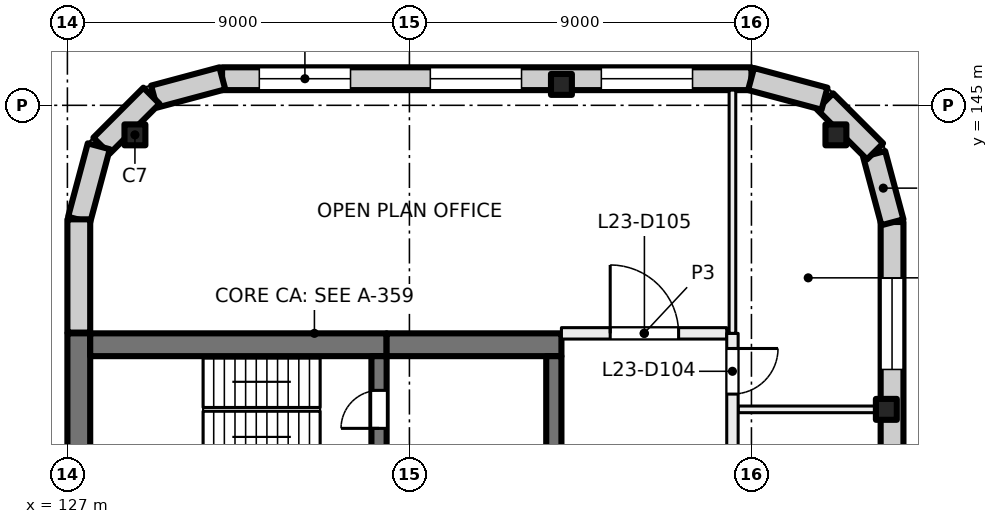
"""IFC4 building model, lengths in metres.
Left out: names, types, materials, properties, quantities, classifications, styles, units other than length and angle.
Written with IfcOpenShell. Run it as: python <this file> out.ifc"""

import sys

from ifc_helpers import new_model, si_unit, direction, frame, frame_2d, origin, origin_2d, place, context, subcontext, project, spatial, rectangle, extrude, element, fill, save


model = new_model("IFC4")
c1 = context("Model", 3, precision=1e-05, world=origin(), true_north=direction((0.0, 1.0)))
c2 = subcontext(c1, "Body", "Model", "MODEL_VIEW")
j1 = project(units=[si_unit("LENGTHUNIT", "METRE"), si_unit("PLANEANGLEUNIT", "RADIAN")], contexts=[c1])
p1 = place(None, origin())
s1 = spatial("IfcSite", under=j1, at=p1, CompositionType="ELEMENT")
p2 = place(p1, origin())
s2 = spatial("IfcBuilding", under=s1, at=p2, CompositionType="ELEMENT")
p3 = place(p2, frame((0.0, 0.0, 101.0)))
s3 = spatial("IfcBuildingStorey", under=s2, at=p3, CompositionType="ELEMENT", Elevation=101.0)
for number, where, z_axis, x_axis in (
    (1, (128.777, 144.223, 0.0), (0.0, 0.0, 1.0), (1.0, 0.0, 0.0)),
    (2, (148.55, 137.0, 0.0), (0.0, 0.0, 1.0), (1.0, 0.0, 0.0)),
    (3, (140.0, 145.55, 0.0), (0.0, 0.0, 1.0), (1.0, 0.0, 0.0)),
    (4, (147.223, 144.223, 0.0), (0.0, 0.0, 1.0), (1.0, 0.0, 0.0)),
):
    element("IfcColumn", number, at=place(p3, frame(where, z_axis=z_axis, x_axis=x_axis)), inside=s3, PredefinedType="COLUMN", context=c2, shape_type="SweptSolid", body=[
        extrude(rectangle(XDim=0.55, YDim=0.55, at=origin_2d()), origin(), (0.0, 0.0, 1.0), 4.0),
    ])
p4 = place(p3, frame((127.3, 135.2, 0.0), z_axis=(0.0, 0.0, 1.0), x_axis=(0.0, 1.0, 0.0)))
e5 = element("IfcWall", 5, at=p4, inside=s3, PredefinedType="SHEAR", context=c2, shape_type="SweptSolid", body=[
    extrude(rectangle(XDim=3.8, YDim=0.6, at=frame_2d((1.9, 0.0))), origin(), (0.0, 0.0, 1.0), 4.0),
])
p5 = place(p3, frame((127.6, 138.7, 0.0), z_axis=(0.0, 0.0, 1.0), x_axis=(1.0, 0.0, 0.0)))
e6 = element("IfcWall", 6, at=p5, inside=s3, PredefinedType="SHEAR", context=c2, shape_type="SweptSolid", body=[
    extrude(rectangle(XDim=7.8, YDim=0.6, at=frame_2d((3.9, 0.0))), origin(), (0.0, 0.0, 1.0), 4.0),
])
p6 = place(p3, frame((135.4, 138.7, 0.0), z_axis=(0.0, 0.0, 1.0), x_axis=(1.0, 0.0, 0.0)))
e7 = element("IfcWall", 7, at=p6, inside=s3, PredefinedType="SHEAR", context=c2, shape_type="SweptSolid", body=[
    extrude(rectangle(XDim=4.6, YDim=0.6, at=frame_2d((2.3, 0.0))), origin(), (0.0, 0.0, 1.0), 4.0),
])
p7 = place(p3, frame((135.2, 135.6, 0.0), z_axis=(0.0, 0.0, 1.0), x_axis=(0.0, 1.0, 0.0)))
e8 = element("IfcWall", 8, at=p7, inside=s3, PredefinedType="SHEAR", context=c2, shape_type="SweptSolid", body=[
    extrude(rectangle(XDim=2.8, YDim=0.4, at=frame_2d((1.4, 0.0))), origin(), (0.0, 0.0, 1.0), 4.0),
])
p8 = place(p7, frame((0.9, 0.0, 0.0)))
e9 = element("IfcOpeningElement", 9, at=p8, cuts=e8, PredefinedType="OPENING", context=c2, shape_type="SweptSolid", body=[
    extrude(rectangle(XDim=1.0, YDim=2.1, at=frame_2d((0.5, 1.05))), frame((0.0, 0.21, 0.0), z_axis=(0.0, -1.0, 0.0), x_axis=(1.0, 0.0, 0.0)), (0.0, 0.0, 1.0), 0.42),
])
p9 = place(p3, frame((139.8, 129.8, 0.0), z_axis=(0.0, 0.0, 1.0), x_axis=(0.0, 1.0, 0.0)))
e10 = element("IfcWall", 10, at=p9, inside=s3, PredefinedType="SHEAR", context=c2, shape_type="SweptSolid", body=[
    extrude(rectangle(XDim=8.6, YDim=0.4, at=frame_2d((4.3, 0.0))), origin(), (0.0, 0.0, 1.0), 4.0),
])
p10 = place(p3, frame((131.07, 145.7, 0.0), z_axis=(0.0, 0.0, 1.0), x_axis=(1.0, 0.0, 0.0)))
e11 = element("IfcWall", 11, at=p10, inside=s3, PredefinedType="SOLIDWALL", context=c2, shape_type="SweptSolid", body=[
    extrude(rectangle(XDim=13.93, YDim=0.6, at=frame_2d((6.965, 0.0))), origin(), (0.0, 0.0, 1.0), 3.625),
])
p11 = place(p10, frame((0.98, 0.0, 0.9)))
e12 = element("IfcOpeningElement", 12, at=p11, cuts=e11, PredefinedType="OPENING", context=c2, shape_type="SweptSolid", body=[
    extrude(rectangle(XDim=2.4, YDim=2.4, at=frame_2d((1.2, 1.2))), frame((0.0, 0.31, 0.0), z_axis=(0.0, -1.0, 0.0), x_axis=(1.0, 0.0, 0.0)), (0.0, 0.0, 1.0), 0.62),
])
p12 = place(p10, frame((5.48, 0.0, 0.9)))
e13 = element("IfcOpeningElement", 13, at=p12, cuts=e11, PredefinedType="OPENING", context=c2, shape_type="SweptSolid", body=[
    extrude(rectangle(XDim=2.4, YDim=2.4, at=frame_2d((1.2, 1.2))), frame((0.0, 0.31, 0.0), z_axis=(0.0, -1.0, 0.0), x_axis=(1.0, 0.0, 0.0)), (0.0, 0.0, 1.0), 0.62),
])
p13 = place(p10, frame((9.98, 0.0, 0.9)))
e14 = element("IfcOpeningElement", 14, at=p13, cuts=e11, PredefinedType="OPENING", context=c2, shape_type="SweptSolid", body=[
    extrude(rectangle(XDim=2.4, YDim=2.4, at=frame_2d((1.2, 1.2))), frame((0.0, 0.31, 0.0), z_axis=(0.0, -1.0, 0.0), x_axis=(1.0, 0.0, 0.0)), (0.0, 0.0, 1.0), 0.62),
])
for number, where, z_axis, x_axis in (
    (15, (129.281, 145.229, 0.0), (0.0, 0.0, 1.0), (0.966, 0.259, 0.0)),
    (16, (127.896, 143.936, 0.0), (0.0, 0.0, 1.0), (0.707, 0.707, 0.0)),
):
    element("IfcWall", number, at=place(p3, frame(where, z_axis=z_axis, x_axis=x_axis)), inside=s3, PredefinedType="SOLIDWALL", context=c2, shape_type="SweptSolid", body=[
        extrude(rectangle(XDim=1.861, YDim=0.6, at=frame_2d((0.93, 0.0))), origin(), (0.0, 0.0, 1.0), 3.625),
    ])
p14 = place(p3, frame((127.308, 141.99, 0.0), z_axis=(0.0, 0.0, 1.0), x_axis=(0.258839784042, 0.965920269068, 0.0)))
e17 = element("IfcWall", 17, at=p14, inside=s3, PredefinedType="SOLIDWALL", context=c2, shape_type="SweptSolid", body=[
    extrude(rectangle(XDim=2.0, YDim=0.6, at=frame_2d((1.0, 0.0))), origin(), (0.0, 0.0, 1.0), 3.625),
])
p15 = place(p3, frame((127.3, 139.02, 0.0), z_axis=(0.0, 0.0, 1.0), x_axis=(0.0, 1.0, 0.0)))
e18 = element("IfcWall", 18, at=p15, inside=s3, PredefinedType="SOLIDWALL", context=c2, shape_type="SweptSolid", body=[
    extrude(rectangle(XDim=2.98, YDim=0.6, at=frame_2d((1.49, 0.0))), origin(), (0.0, 0.0, 1.0), 3.625),
])
p16 = place(p3, frame((148.7, 141.93, 0.0), z_axis=(0.0, 0.0, 1.0), x_axis=(0.0, -1.0, 0.0)))
e19 = element("IfcWall", 19, at=p16, inside=s3, PredefinedType="SOLIDWALL", context=c2, shape_type="SweptSolid", body=[
    extrude(rectangle(XDim=27.93, YDim=0.6, at=frame_2d((13.965, 0.0))), origin(), (0.0, 0.0, 1.0), 3.625),
])
p17 = place(p16, frame((1.48, 0.0, 0.9)))
e20 = element("IfcOpeningElement", 20, at=p17, cuts=e19, PredefinedType="OPENING", context=c2, shape_type="SweptSolid", body=[
    extrude(rectangle(XDim=2.4, YDim=2.4, at=frame_2d((1.2, 1.2))), frame((0.0, 0.31, 0.0), z_axis=(0.0, -1.0, 0.0), x_axis=(1.0, 0.0, 0.0)), (0.0, 0.0, 1.0), 0.62),
])
p18 = place(p16, frame((5.98, 0.0, 0.9)))
e21 = element("IfcOpeningElement", 21, at=p18, cuts=e19, PredefinedType="OPENING", context=c2, shape_type="SweptSolid", body=[
    extrude(rectangle(XDim=2.4, YDim=2.4, at=frame_2d((1.2, 1.2))), frame((0.0, 0.31, 0.0), z_axis=(0.0, -1.0, 0.0), x_axis=(1.0, 0.0, 0.0)), (0.0, 0.0, 1.0), 0.62),
])
p19 = place(p16, frame((10.48, 0.0, 0.9)))
e22 = element("IfcOpeningElement", 22, at=p19, cuts=e19, PredefinedType="OPENING", context=c2, shape_type="SweptSolid", body=[
    extrude(rectangle(XDim=2.4, YDim=2.4, at=frame_2d((1.2, 1.2))), frame((0.0, 0.31, 0.0), z_axis=(0.0, -1.0, 0.0), x_axis=(1.0, 0.0, 0.0)), (0.0, 0.0, 1.0), 0.62),
])
p20 = place(p16, frame((14.98, 0.0, 0.9)))
e23 = element("IfcOpeningElement", 23, at=p20, cuts=e19, PredefinedType="OPENING", context=c2, shape_type="SweptSolid", body=[
    extrude(rectangle(XDim=2.4, YDim=2.4, at=frame_2d((1.2, 1.2))), frame((0.0, 0.31, 0.0), z_axis=(0.0, -1.0, 0.0), x_axis=(1.0, 0.0, 0.0)), (0.0, 0.0, 1.0), 0.62),
])
p21 = place(p16, frame((19.48, 0.0, 0.9)))
e24 = element("IfcOpeningElement", 24, at=p21, cuts=e19, PredefinedType="OPENING", context=c2, shape_type="SweptSolid", body=[
    extrude(rectangle(XDim=2.4, YDim=2.4, at=frame_2d((1.2, 1.2))), frame((0.0, 0.31, 0.0), z_axis=(0.0, -1.0, 0.0), x_axis=(1.0, 0.0, 0.0)), (0.0, 0.0, 1.0), 0.62),
])
p22 = place(p16, frame((23.98, 0.0, 0.9)))
e25 = element("IfcOpeningElement", 25, at=p22, cuts=e19, PredefinedType="OPENING", context=c2, shape_type="SweptSolid", body=[
    extrude(rectangle(XDim=2.4, YDim=2.4, at=frame_2d((1.2, 1.2))), frame((0.0, 0.31, 0.0), z_axis=(0.0, -1.0, 0.0), x_axis=(1.0, 0.0, 0.0)), (0.0, 0.0, 1.0), 0.62),
])
for number, where, z_axis, x_axis in (
    (26, (148.229, 143.719, 0.0), (0.0, 0.0, 1.0), (0.259, -0.966, 0.0)),
    (27, (146.936, 145.104, 0.0), (0.0, 0.0, 1.0), (0.707, -0.707, 0.0)),
):
    element("IfcWall", number, at=place(p3, frame(where, z_axis=z_axis, x_axis=x_axis)), inside=s3, PredefinedType="SOLIDWALL", context=c2, shape_type="SweptSolid", body=[
        extrude(rectangle(XDim=1.861, YDim=0.6, at=frame_2d((0.93, 0.0))), origin(), (0.0, 0.0, 1.0), 3.625),
    ])
p23 = place(p3, frame((144.99, 145.692, 0.0), z_axis=(0.0, 0.0, 1.0), x_axis=(0.965920269068, -0.258839784042, 0.0)))
e28 = element("IfcWall", 28, at=p23, inside=s3, PredefinedType="SOLIDWALL", context=c2, shape_type="SweptSolid", body=[
    extrude(rectangle(XDim=2.0, YDim=0.6, at=frame_2d((1.0, 0.0))), origin(), (0.0, 0.0, 1.0), 3.625),
])
p24 = place(p3, frame((140.0, 139.0, 0.0), z_axis=(0.0, 0.0, 1.0), x_axis=(1.0, 0.0, 0.0)))
e29 = element("IfcWall", 29, at=p24, inside=s3, PredefinedType="PARTITIONING", context=c2, shape_type="SweptSolid", body=[
    extrude(rectangle(XDim=4.35, YDim=0.3, at=frame_2d((2.175, 0.0))), origin(), (0.0, 0.0, 1.0), 3.625),
])
p25 = place(p24, frame((1.283, 0.0, 0.0)))
e30 = element("IfcOpeningElement", 30, at=p25, cuts=e29, PredefinedType="OPENING", context=c2, shape_type="SweptSolid", body=[
    extrude(rectangle(XDim=1.8, YDim=2.1, at=frame_2d((0.9, 1.05))), frame((0.0, 0.16, 0.0), z_axis=(0.0, -1.0, 0.0), x_axis=(1.0, 0.0, 0.0)), (0.0, 0.0, 1.0), 0.32),
])
p26 = place(p3, frame((144.65, 137.0, 0.0), z_axis=(0.0, 0.0, 1.0), x_axis=(1.0, 0.0, 0.0)))
e31 = element("IfcWall", 31, at=p26, inside=s3, PredefinedType="PARTITIONING", context=c2, shape_type="SweptSolid", body=[
    extrude(rectangle(XDim=3.75, YDim=0.175, at=frame_2d((1.875, 0.0))), origin(), (0.0, 0.0, 1.0), 3.625),
])
p27 = place(p3, frame((144.5, 139.0, 0.0), z_axis=(0.0, 0.0, 1.0), x_axis=(0.0, -1.0, 0.0)))
e32 = element("IfcWall", 32, at=p27, inside=s3, PredefinedType="PARTITIONING", context=c2, shape_type="SweptSolid", body=[
    extrude(rectangle(XDim=22.0, YDim=0.3, at=frame_2d((11.0, 0.0))), origin(), (0.0, 0.0, 1.0), 3.625),
])
p28 = place(p27, frame((20.501, 0.0, 0.0)))
e33 = element("IfcOpeningElement", 33, at=p28, cuts=e32, PredefinedType="OPENING", context=c2, shape_type="SweptSolid", body=[
    extrude(rectangle(XDim=1.0, YDim=2.1, at=frame_2d((0.5, 1.05))), frame((0.0, 0.16, 0.0), z_axis=(0.0, -1.0, 0.0), x_axis=(1.0, 0.0, 0.0)), (0.0, 0.0, 1.0), 0.32),
])
p29 = place(p27, frame((15.0, 0.0, 0.0)))
e34 = element("IfcOpeningElement", 34, at=p29, cuts=e32, PredefinedType="OPENING", context=c2, shape_type="SweptSolid", body=[
    extrude(rectangle(XDim=1.0, YDim=2.1, at=frame_2d((0.5, 1.05))), frame((0.0, 0.16, 0.0), z_axis=(0.0, -1.0, 0.0), x_axis=(1.0, 0.0, 0.0)), (0.0, 0.0, 1.0), 0.32),
])
p30 = place(p27, frame((6.0, 0.0, 0.0)))
e35 = element("IfcOpeningElement", 35, at=p30, cuts=e32, PredefinedType="OPENING", context=c2, shape_type="SweptSolid", body=[
    extrude(rectangle(XDim=1.0, YDim=2.1, at=frame_2d((0.5, 1.05))), frame((0.0, 0.16, 0.0), z_axis=(0.0, -1.0, 0.0), x_axis=(1.0, 0.0, 0.0)), (0.0, 0.0, 1.0), 0.32),
])
p31 = place(p27, frame((0.398, 0.0, 0.0)))
e36 = element("IfcOpeningElement", 36, at=p31, cuts=e32, PredefinedType="OPENING", context=c2, shape_type="SweptSolid", body=[
    extrude(rectangle(XDim=1.2, YDim=2.1, at=frame_2d((0.6, 1.05))), frame((0.0, 0.16, 0.0), z_axis=(0.0, -1.0, 0.0), x_axis=(1.0, 0.0, 0.0)), (0.0, 0.0, 1.0), 0.32),
])
p32 = place(p3, frame((144.5, 145.4, 0.0), z_axis=(0.0, 0.0, 1.0), x_axis=(0.0, -1.0, 0.0)))
e37 = element("IfcWall", 37, at=p32, inside=s3, PredefinedType="PARTITIONING", context=c2, shape_type="SweptSolid", body=[
    extrude(rectangle(XDim=6.4, YDim=0.175, at=frame_2d((3.2, 0.0))), origin(), (0.0, 0.0, 1.0), 3.625),
])
p33 = place(p11, origin())
e38 = element("IfcWindow", 38, at=p33, inside=s3, PartitioningType="SINGLE_PANEL", PredefinedType="WINDOW", context=c2, shape_type="SweptSolid", body=[
    extrude(rectangle(XDim=2.4, YDim=2.4, at=frame_2d((1.2, 1.2))), frame((0.0, 0.03, 0.0), z_axis=(0.0, -1.0, 0.0), x_axis=(1.0, 0.0, 0.0)), (0.0, 0.0, 1.0), 0.06),
])
fill(e12, e38)
p34 = place(p12, origin())
e39 = element("IfcWindow", 39, at=p34, inside=s3, PartitioningType="SINGLE_PANEL", PredefinedType="WINDOW", context=c2, shape_type="SweptSolid", body=[
    extrude(rectangle(XDim=2.4, YDim=2.4, at=frame_2d((1.2, 1.2))), frame((0.0, 0.03, 0.0), z_axis=(0.0, -1.0, 0.0), x_axis=(1.0, 0.0, 0.0)), (0.0, 0.0, 1.0), 0.06),
])
fill(e13, e39)
p35 = place(p13, origin())
e40 = element("IfcWindow", 40, at=p35, inside=s3, PartitioningType="SINGLE_PANEL", PredefinedType="WINDOW", context=c2, shape_type="SweptSolid", body=[
    extrude(rectangle(XDim=2.4, YDim=2.4, at=frame_2d((1.2, 1.2))), frame((0.0, 0.03, 0.0), z_axis=(0.0, -1.0, 0.0), x_axis=(1.0, 0.0, 0.0)), (0.0, 0.0, 1.0), 0.06),
])
fill(e14, e40)
p36 = place(p17, origin())
e41 = element("IfcWindow", 41, at=p36, inside=s3, PartitioningType="SINGLE_PANEL", PredefinedType="WINDOW", context=c2, shape_type="SweptSolid", body=[
    extrude(rectangle(XDim=2.4, YDim=2.4, at=frame_2d((1.2, 1.2))), frame((0.0, 0.03, 0.0), z_axis=(0.0, -1.0, 0.0), x_axis=(1.0, 0.0, 0.0)), (0.0, 0.0, 1.0), 0.06),
])
fill(e20, e41)
p37 = place(p8, origin())
e42 = element("IfcDoor", 42, at=p37, inside=s3, OperationType="SINGLE_SWING_LEFT", PredefinedType="DOOR", context=c2, shape_type="SweptSolid", body=[
    extrude(rectangle(XDim=1.0, YDim=2.1, at=frame_2d((0.5, 1.05))), frame((0.0, 0.025, 0.0), z_axis=(0.0, -1.0, 0.0), x_axis=(1.0, 0.0, 0.0)), (0.0, 0.0, 1.0), 0.05),
])
fill(e9, e42)
p38 = place(p31, origin())
e43 = element("IfcDoor", 43, at=p38, inside=s3, OperationType="DOUBLE_DOOR_SINGLE_SWING", PredefinedType="DOOR", context=c2, shape_type="SweptSolid", body=[
    extrude(rectangle(XDim=1.2, YDim=2.1, at=frame_2d((0.6, 1.05))), frame((0.0, 0.025, 0.0), z_axis=(0.0, -1.0, 0.0), x_axis=(1.0, 0.0, 0.0)), (0.0, 0.0, 1.0), 0.05),
])
fill(e36, e43)
p39 = place(p25, origin())
e44 = element("IfcDoor", 44, at=p39, inside=s3, OperationType="DOUBLE_DOOR_SINGLE_SWING", PredefinedType="DOOR", context=c2, shape_type="SweptSolid", body=[
    extrude(rectangle(XDim=1.8, YDim=2.1, at=frame_2d((0.9, 1.05))), frame((0.0, 0.025, 0.0), z_axis=(0.0, -1.0, 0.0), x_axis=(1.0, 0.0, 0.0)), (0.0, 0.0, 1.0), 0.05),
])
fill(e30, e44)
save(model, sys.argv[1])
